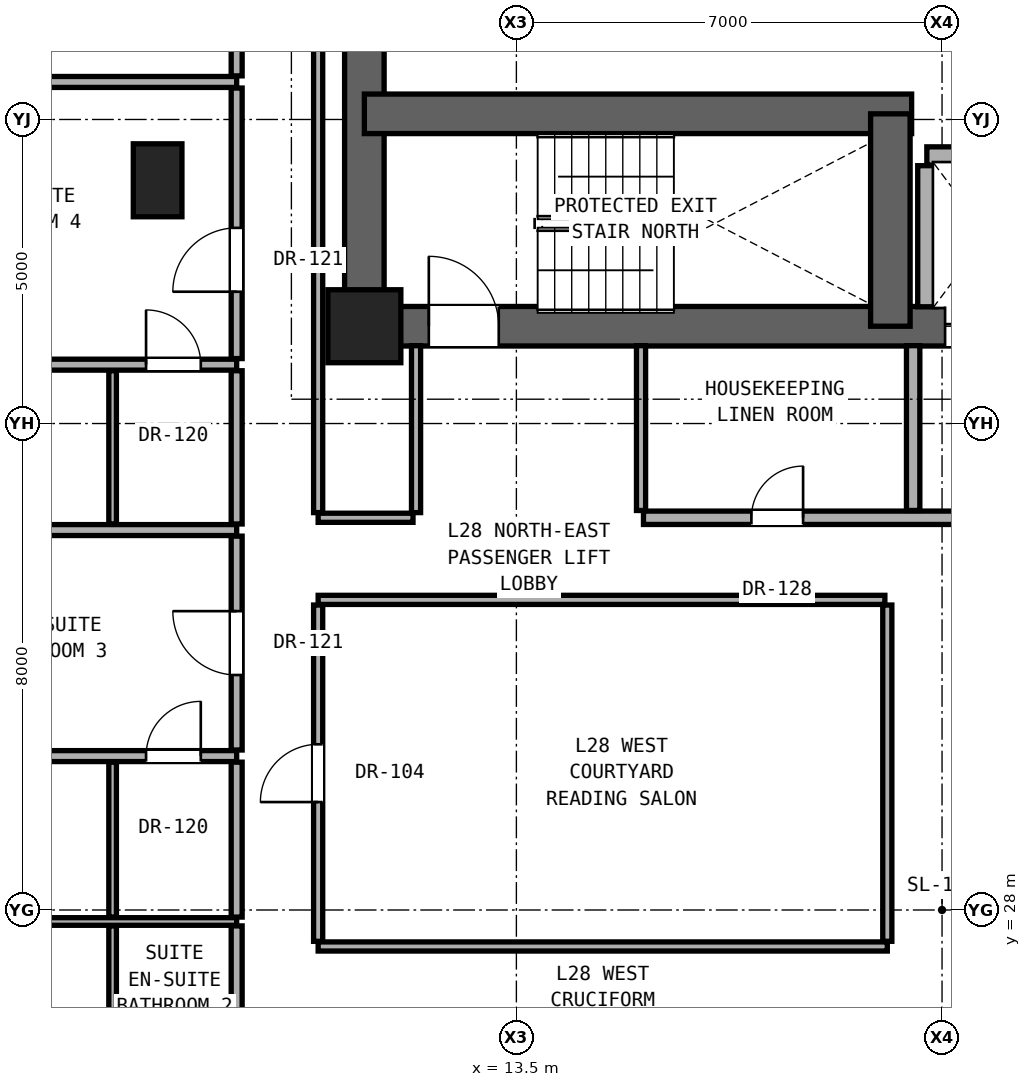
"""IFC4 building model, lengths in metres.
Left out: names, types, materials, properties, quantities, classifications, styles, units other than length and angle.
Written with IfcOpenShell. Run it as: python <this file> out.ifc"""

import sys

from ifc_helpers import new_model, si_unit, direction, frame, frame_2d, origin, origin_2d, place, context, subcontext, project, spatial, rectangle, extrude, element, fill, save


model = new_model("IFC4")
c1 = context("Model", 3, precision=1e-05, world=origin(), true_north=direction((0.0, 1.0)))
c2 = subcontext(c1, "Body", "Model", "MODEL_VIEW")
j1 = project(units=[si_unit("LENGTHUNIT", "METRE"), si_unit("PLANEANGLEUNIT", "RADIAN")], contexts=[c1])
p1 = place(None, origin())
s1 = spatial("IfcSite", under=j1, at=p1, CompositionType="ELEMENT")
p2 = place(p1, origin())
s2 = spatial("IfcBuilding", under=s1, at=p2, CompositionType="ELEMENT")
p3 = place(p2, frame((0.0, 0.0, 101.6)))
s3 = spatial("IfcBuildingStorey", under=s2, at=p3, CompositionType="ELEMENT", Elevation=101.6)
p4 = place(p3, frame((11.0, 37.6, 0.0), z_axis=(0.0, 0.0, 1.0), x_axis=(1.0, 0.0, 0.0)))
e1 = element("IfcColumn", 1, at=p4, inside=s3, PredefinedType="COLUMN", context=c2, shape_type="SweptSolid", body=[
    extrude(rectangle(XDim=1.2, YDim=1.2, at=origin_2d()), origin(), (0.0, 0.0, 1.0), 3.3),
])
p5 = place(p3, frame((7.6, 40.0, 0.0), z_axis=(0.0, 0.0, 1.0), x_axis=(1.0, 0.0, 0.0)))
e2 = element("IfcColumn", 2, at=p5, inside=s3, PredefinedType="PILASTER", context=c2, shape_type="SweptSolid", body=[
    extrude(rectangle(XDim=0.8, YDim=1.2, at=origin_2d()), origin(), (0.0, 0.0, 1.0), 3.3),
])
p6 = place(p3, frame((11.0, 37.6, 0.0), z_axis=(0.0, 0.0, 1.0), x_axis=(0.0, 1.0, 0.0)))
e3 = element("IfcWall", 3, at=p6, inside=s3, PredefinedType="SHEAR", context=c2, shape_type="SweptSolid", body=[
    extrude(rectangle(XDim=6.0, YDim=0.65, at=frame_2d((3.0, 0.0))), origin(), (0.0, 0.0, 1.0), 3.08),
])
p7 = place(p3, frame((11.0, 37.6, 0.0), z_axis=(0.0, 0.0, 1.0), x_axis=(1.0, 0.0, 0.0)))
e4 = element("IfcWall", 4, at=p7, inside=s3, PredefinedType="SHEAR", context=c2, shape_type="SweptSolid", body=[
    extrude(rectangle(XDim=19.0, YDim=0.65, at=frame_2d((9.5, 0.0))), origin(), (0.0, 0.0, 1.0), 3.08),
])
p8 = place(p7, frame((1.06, 0.0, 0.0)))
e5 = element("IfcOpeningElement", 5, at=p8, cuts=e4, PredefinedType="OPENING", context=c2, shape_type="SweptSolid", body=[
    extrude(rectangle(XDim=1.15, YDim=2.2, at=frame_2d((0.575, 1.1))), frame((0.0, 0.335, 0.0), z_axis=(0.0, -1.0, 0.0), x_axis=(1.0, 0.0, 0.0)), (0.0, 0.0, 1.0), 0.67),
])
p9 = place(p7, frame((9.55, 0.0, 0.0)))
e6 = element("IfcOpeningElement", 6, at=p9, cuts=e4, PredefinedType="OPENING", context=c2, shape_type="SweptSolid", body=[
    extrude(rectangle(XDim=1.4, YDim=2.35, at=frame_2d((0.7, 1.175))), frame((0.0, 0.335, 0.0), z_axis=(0.0, -1.0, 0.0), x_axis=(1.0, 0.0, 0.0)), (0.0, 0.0, 1.0), 0.67),
])
p10 = place(p7, frame((11.95, 0.0, 0.0)))
e7 = element("IfcOpeningElement", 7, at=p10, cuts=e4, PredefinedType="OPENING", context=c2, shape_type="SweptSolid", body=[
    extrude(rectangle(XDim=1.4, YDim=2.35, at=frame_2d((0.7, 1.175))), frame((0.0, 0.335, 0.0), z_axis=(0.0, -1.0, 0.0), x_axis=(1.0, 0.0, 0.0)), (0.0, 0.0, 1.0), 0.67),
])
p11 = place(p3, frame((11.0, 41.093, 0.0), z_axis=(0.0, 0.0, 1.0), x_axis=(1.0, 0.0, 0.0)))
e8 = element("IfcWall", 8, at=p11, inside=s3, PredefinedType="SHEAR", context=c2, shape_type="SweptSolid", body=[
    extrude(rectangle(XDim=9.0, YDim=0.65, at=frame_2d((4.5, 0.0))), origin(), (0.0, 0.0, 1.0), 3.08),
])
p12 = place(p3, frame((19.65, 37.6, 0.0), z_axis=(0.0, 0.0, 1.0), x_axis=(0.0, 1.0, 0.0)))
e9 = element("IfcWall", 9, at=p12, inside=s3, PredefinedType="SHEAR", context=c2, shape_type="SweptSolid", body=[
    extrude(rectangle(XDim=3.493, YDim=0.65, at=frame_2d((1.747, 0.0))), origin(), (0.0, 0.0, 1.0), 3.08),
])
p13 = place(p3, frame((10.24, 27.4, 0.0), z_axis=(0.0, 0.0, 1.0), x_axis=(1.0, 0.0, 0.0)))
e10 = element("IfcWall", 10, at=p13, inside=s3, PredefinedType="PARTITIONING", context=c2, shape_type="SweptSolid", body=[
    extrude(rectangle(XDim=9.36, YDim=0.15, at=frame_2d((4.68, 0.0))), origin(), (0.0, 0.0, 1.0), 2.124),
])
p14 = place(p3, frame((-0.85, 27.811, 0.0), z_axis=(0.0, 0.0, 1.0), x_axis=(1.0, 0.0, 0.0)))
e11 = element("IfcWall", 11, at=p14, inside=s3, PredefinedType="PARTITIONING", context=c2, shape_type="SweptSolid", body=[
    extrude(rectangle(XDim=9.75, YDim=0.125, at=frame_2d((4.875, 0.0))), origin(), (0.0, 0.0, 1.0), 2.145),
])
p15 = place(p3, frame((-0.85, 30.531, 0.0), z_axis=(0.0, 0.0, 1.0), x_axis=(1.0, 0.0, 0.0)))
e12 = element("IfcWall", 12, at=p15, inside=s3, PredefinedType="PARTITIONING", context=c2, shape_type="SweptSolid", body=[
    extrude(rectangle(XDim=9.75, YDim=0.18, at=frame_2d((4.875, 0.0))), origin(), (0.0, 0.0, 1.0), 2.145),
])
p16 = place(p15, frame((3.75, 0.0, 0.0)))
e13 = element("IfcOpeningElement", 13, at=p16, cuts=e12, PredefinedType="OPENING", context=c2, shape_type="SweptSolid", body=[
    extrude(rectangle(XDim=0.85, YDim=2.01, at=frame_2d((0.425, 1.005))), frame((0.0, 0.1, 0.0), z_axis=(0.0, -1.0, 0.0), x_axis=(1.0, 0.0, 0.0)), (0.0, 0.0, 1.0), 0.2),
])
p17 = place(p15, frame((8.26, 0.0, 0.0)))
e14 = element("IfcOpeningElement", 14, at=p17, cuts=e12, PredefinedType="OPENING", context=c2, shape_type="SweptSolid", body=[
    extrude(rectangle(XDim=0.9, YDim=2.1, at=frame_2d((0.45, 1.05))), frame((0.0, 0.1, 0.0), z_axis=(0.0, -1.0, 0.0), x_axis=(1.0, 0.0, 0.0)), (0.0, 0.0, 1.0), 0.2),
])
p18 = place(p3, frame((10.24, 33.1, 0.0), z_axis=(0.0, 0.0, 1.0), x_axis=(1.0, 0.0, 0.0)))
e15 = element("IfcWall", 15, at=p18, inside=s3, PredefinedType="PARTITIONING", context=c2, shape_type="SweptSolid", body=[
    extrude(rectangle(XDim=9.32, YDim=0.15, at=frame_2d((4.66, 0.0))), origin(), (0.0, 0.0, 1.0), 2.124),
])
p19 = place(p3, frame((-0.85, 34.248, 0.0), z_axis=(0.0, 0.0, 1.0), x_axis=(1.0, 0.0, 0.0)))
e16 = element("IfcWall", 16, at=p19, inside=s3, PredefinedType="PARTITIONING", context=c2, shape_type="SweptSolid", body=[
    extrude(rectangle(XDim=9.75, YDim=0.18, at=frame_2d((4.875, 0.0))), origin(), (0.0, 0.0, 1.0), 2.145),
])
p20 = place(p3, frame((10.24, 34.45, 0.0), z_axis=(0.0, 0.0, 1.0), x_axis=(1.0, 0.0, 0.0)))
e17 = element("IfcWall", 17, at=p20, inside=s3, PredefinedType="PARTITIONING", context=c2, shape_type="SweptSolid", body=[
    extrude(rectangle(XDim=1.56, YDim=0.15, at=frame_2d((0.78, 0.0))), origin(), (0.0, 0.0, 1.0), 2.124),
])
p21 = place(p3, frame((15.59, 34.45, 0.0), z_axis=(0.0, 0.0, 1.0), x_axis=(1.0, 0.0, 0.0)))
e18 = element("IfcWall", 18, at=p21, inside=s3, PredefinedType="SOLIDWALL", context=c2, shape_type="SweptSolid", body=[
    extrude(rectangle(XDim=15.17, YDim=0.22, at=frame_2d((7.585, 0.0))), origin(), (0.0, 0.0, 1.0), 2.124),
])
p22 = place(p21, frame((6.435, 0.0, 0.0)))
e19 = element("IfcOpeningElement", 19, at=p22, cuts=e18, PredefinedType="OPENING", context=c2, shape_type="SweptSolid", body=[
    extrude(rectangle(XDim=0.85, YDim=2.01, at=frame_2d((0.425, 1.005))), frame((0.0, 0.12, 0.0), z_axis=(0.0, -1.0, 0.0), x_axis=(1.0, 0.0, 0.0)), (0.0, 0.0, 1.0), 0.24),
])
p23 = place(p21, frame((11.135, 0.0, 0.0)))
e20 = element("IfcOpeningElement", 20, at=p23, cuts=e18, PredefinedType="OPENING", context=c2, shape_type="SweptSolid", body=[
    extrude(rectangle(XDim=0.85, YDim=2.01, at=frame_2d((0.425, 1.005))), frame((0.0, 0.12, 0.0), z_axis=(0.0, -1.0, 0.0), x_axis=(1.0, 0.0, 0.0)), (0.0, 0.0, 1.0), 0.24),
])
p24 = place(p21, frame((1.775, 0.0, 0.0)))
e21 = element("IfcOpeningElement", 21, at=p24, cuts=e18, PredefinedType="OPENING", context=c2, shape_type="SweptSolid", body=[
    extrude(rectangle(XDim=0.85, YDim=2.01, at=frame_2d((0.425, 1.005))), frame((0.0, 0.12, 0.0), z_axis=(0.0, -1.0, 0.0), x_axis=(1.0, 0.0, 0.0)), (0.0, 0.0, 1.0), 0.24),
])
p25 = place(p3, frame((-0.85, 36.968, 0.0), z_axis=(0.0, 0.0, 1.0), x_axis=(1.0, 0.0, 0.0)))
e22 = element("IfcWall", 22, at=p25, inside=s3, PredefinedType="PARTITIONING", context=c2, shape_type="SweptSolid", body=[
    extrude(rectangle(XDim=9.75, YDim=0.18, at=frame_2d((4.875, 0.0))), origin(), (0.0, 0.0, 1.0), 2.145),
])
p26 = place(p25, frame((3.75, 0.0, 0.0)))
e23 = element("IfcOpeningElement", 23, at=p26, cuts=e22, PredefinedType="OPENING", context=c2, shape_type="SweptSolid", body=[
    extrude(rectangle(XDim=0.85, YDim=2.01, at=frame_2d((0.425, 1.005))), frame((0.0, 0.1, 0.0), z_axis=(0.0, -1.0, 0.0), x_axis=(1.0, 0.0, 0.0)), (0.0, 0.0, 1.0), 0.2),
])
p27 = place(p25, frame((8.26, 0.0, 0.0)))
e24 = element("IfcOpeningElement", 24, at=p27, cuts=e22, PredefinedType="OPENING", context=c2, shape_type="SweptSolid", body=[
    extrude(rectangle(XDim=0.9, YDim=2.1, at=frame_2d((0.45, 1.05))), frame((0.0, 0.1, 0.0), z_axis=(0.0, -1.0, 0.0), x_axis=(1.0, 0.0, 0.0)), (0.0, 0.0, 1.0), 0.2),
])
p28 = place(p3, frame((20.25, 40.4, 0.0), z_axis=(0.0, 0.0, 1.0), x_axis=(1.0, 0.0, 0.0)))
e25 = element("IfcWall", 25, at=p28, inside=s3, PredefinedType="SOLIDWALL", context=c2, shape_type="SweptSolid", body=[
    extrude(rectangle(XDim=4.4, YDim=0.3, at=frame_2d((2.2, 0.0))), origin(), (0.0, 0.0, 1.0), 3.08),
])
p29 = place(p3, frame((4.475, 41.617, 0.0), z_axis=(0.0, 0.0, 1.0), x_axis=(1.0, 0.0, 0.0)))
e26 = element("IfcWall", 26, at=p29, inside=s3, PredefinedType="PARTITIONING", context=c2, shape_type="SweptSolid", body=[
    extrude(rectangle(XDim=4.425, YDim=0.18, at=frame_2d((2.212, 0.0))), origin(), (0.0, 0.0, 1.0), 3.08),
])
p30 = place(p3, frame((6.86, 25.348, 0.0), z_axis=(0.0, 0.0, 1.0), x_axis=(0.0, 1.0, 0.0)))
e27 = element("IfcWall", 27, at=p30, inside=s3, PredefinedType="PARTITIONING", context=c2, shape_type="SweptSolid", body=[
    extrude(rectangle(XDim=2.391, YDim=0.125, at=frame_2d((1.195, 0.0))), origin(), (0.0, 0.0, 1.0), 3.08),
])
p31 = place(p3, frame((6.86, 27.884, 0.0), z_axis=(0.0, 0.0, 1.0), x_axis=(0.0, 1.0, 0.0)))
e28 = element("IfcWall", 28, at=p31, inside=s3, PredefinedType="PARTITIONING", context=c2, shape_type="SweptSolid", body=[
    extrude(rectangle(XDim=2.547, YDim=0.125, at=frame_2d((1.274, 0.0))), origin(), (0.0, 0.0, 1.0), 3.08),
])
p32 = place(p3, frame((6.86, 34.348, 0.0), z_axis=(0.0, 0.0, 1.0), x_axis=(0.0, 1.0, 0.0)))
e29 = element("IfcWall", 29, at=p32, inside=s3, PredefinedType="PARTITIONING", context=c2, shape_type="SweptSolid", body=[
    extrude(rectangle(XDim=2.52, YDim=0.125, at=frame_2d((1.26, 0.0))), origin(), (0.0, 0.0, 1.0), 3.08),
])
p33 = place(p3, frame((8.9, 25.348, 0.0), z_axis=(0.0, 0.0, 1.0), x_axis=(0.0, 1.0, 0.0)))
e30 = element("IfcWall", 30, at=p33, inside=s3, PredefinedType="PARTITIONING", context=c2, shape_type="SweptSolid", body=[
    extrude(rectangle(XDim=2.391, YDim=0.18, at=frame_2d((1.195, 0.0))), origin(), (0.0, 0.0, 1.0), 3.08),
])
p34 = place(p3, frame((8.9, 27.884, 0.0), z_axis=(0.0, 0.0, 1.0), x_axis=(0.0, 1.0, 0.0)))
e31 = element("IfcWall", 31, at=p34, inside=s3, PredefinedType="PARTITIONING", context=c2, shape_type="SweptSolid", body=[
    extrude(rectangle(XDim=2.547, YDim=0.18, at=frame_2d((1.274, 0.0))), origin(), (0.0, 0.0, 1.0), 3.08),
])
p35 = place(p3, frame((8.9, 30.631, 0.0), z_axis=(0.0, 0.0, 1.0), x_axis=(0.0, 1.0, 0.0)))
e32 = element("IfcWall", 32, at=p35, inside=s3, PredefinedType="PARTITIONING", context=c2, shape_type="SweptSolid", body=[
    extrude(rectangle(XDim=3.517, YDim=0.18, at=frame_2d((1.758, 0.0))), origin(), (0.0, 0.0, 1.0), 2.299),
])
p36 = place(p35, frame((1.233, 0.0, 0.0)))
e33 = element("IfcOpeningElement", 33, at=p36, cuts=e32, PredefinedType="OPENING", context=c2, shape_type="SweptSolid", body=[
    extrude(rectangle(XDim=1.05, YDim=2.2, at=frame_2d((0.525, 1.1))), frame((0.0, 0.1, 0.0), z_axis=(0.0, -1.0, 0.0), x_axis=(1.0, 0.0, 0.0)), (0.0, 0.0, 1.0), 0.2),
])
p37 = place(p3, frame((8.9, 34.348, 0.0), z_axis=(0.0, 0.0, 1.0), x_axis=(0.0, 1.0, 0.0)))
e34 = element("IfcWall", 34, at=p37, inside=s3, PredefinedType="PARTITIONING", context=c2, shape_type="SweptSolid", body=[
    extrude(rectangle(XDim=2.52, YDim=0.18, at=frame_2d((1.26, 0.0))), origin(), (0.0, 0.0, 1.0), 3.08),
])
p38 = place(p3, frame((8.9, 37.068, 0.0), z_axis=(0.0, 0.0, 1.0), x_axis=(0.0, 1.0, 0.0)))
e35 = element("IfcWall", 35, at=p38, inside=s3, PredefinedType="PARTITIONING", context=c2, shape_type="SweptSolid", body=[
    extrude(rectangle(XDim=4.449, YDim=0.18, at=frame_2d((2.225, 0.0))), origin(), (0.0, 0.0, 1.0), 2.456),
])
p39 = place(p38, frame((1.1, 0.0, 0.0)))
e36 = element("IfcOpeningElement", 36, at=p39, cuts=e35, PredefinedType="OPENING", context=c2, shape_type="SweptSolid", body=[
    extrude(rectangle(XDim=1.05, YDim=2.2, at=frame_2d((0.525, 1.1))), frame((0.0, 0.1, 0.0), z_axis=(0.0, -1.0, 0.0), x_axis=(1.0, 0.0, 0.0)), (0.0, 0.0, 1.0), 0.2),
])
p40 = place(p3, frame((8.9, 41.717, 0.0), z_axis=(0.0, 0.0, 1.0), x_axis=(0.0, 1.0, 0.0)))
e37 = element("IfcWall", 37, at=p40, inside=s3, PredefinedType="PARTITIONING", context=c2, shape_type="SweptSolid", body=[
    extrude(rectangle(XDim=5.205, YDim=0.18, at=frame_2d((2.603, 0.0))), origin(), (0.0, 0.0, 1.0), 3.08),
])
p41 = place(p40, frame((2.127, 0.0, 0.0)))
e38 = element("IfcOpeningElement", 38, at=p41, cuts=e37, PredefinedType="OPENING", context=c2, shape_type="SweptSolid", body=[
    extrude(rectangle(XDim=0.95, YDim=2.15, at=frame_2d((0.475, 1.075))), frame((0.0, 0.1, 0.0), z_axis=(0.0, -1.0, 0.0), x_axis=(1.0, 0.0, 0.0)), (0.0, 0.0, 1.0), 0.2),
])
p42 = place(p3, frame((10.24, 27.485, 0.0), z_axis=(0.0, 0.0, 1.0), x_axis=(0.0, 1.0, 0.0)))
e39 = element("IfcWall", 39, at=p42, inside=s3, PredefinedType="PARTITIONING", context=c2, shape_type="SweptSolid", body=[
    extrude(rectangle(XDim=5.53, YDim=0.15, at=frame_2d((2.765, 0.0))), origin(), (0.0, 0.0, 1.0), 2.299),
])
p43 = place(p42, frame((2.29, 0.0, 0.0)))
e40 = element("IfcOpeningElement", 40, at=p43, cuts=e39, PredefinedType="OPENING", context=c2, shape_type="SweptSolid", body=[
    extrude(rectangle(XDim=0.95, YDim=2.15, at=frame_2d((0.475, 1.075))), frame((0.0, 0.085, 0.0), z_axis=(0.0, -1.0, 0.0), x_axis=(1.0, 0.0, 0.0)), (0.0, 0.0, 1.0), 0.17),
])
p44 = place(p3, frame((10.24, 34.535, 0.0), z_axis=(0.0, 0.0, 1.0), x_axis=(0.0, 1.0, 0.0)))
e41 = element("IfcWall", 41, at=p44, inside=s3, PredefinedType="PARTITIONING", context=c2, shape_type="SweptSolid", body=[
    extrude(rectangle(XDim=9.13, YDim=0.15, at=frame_2d((4.565, 0.0))), origin(), (0.0, 0.0, 1.0), 2.456),
])
p45 = place(p3, frame((11.85, 34.535, 0.0), z_axis=(0.0, 0.0, 1.0), x_axis=(0.0, 1.0, 0.0)))
e42 = element("IfcWall", 42, at=p45, inside=s3, PredefinedType="PARTITIONING", context=c2, shape_type="SweptSolid", body=[
    extrude(rectangle(XDim=2.745, YDim=0.15, at=frame_2d((1.373, 0.0))), origin(), (0.0, 0.0, 1.0), 3.08),
])
p46 = place(p3, frame((15.55, 34.57, 0.0), z_axis=(0.0, 0.0, 1.0), x_axis=(0.0, 1.0, 0.0)))
e43 = element("IfcWall", 43, at=p46, inside=s3, PredefinedType="PARTITIONING", context=c2, shape_type="SweptSolid", body=[
    extrude(rectangle(XDim=2.71, YDim=0.15, at=frame_2d((1.355, 0.0))), origin(), (0.0, 0.0, 1.0), 2.609),
])
p47 = place(p3, frame((19.6, 27.485, 0.0), z_axis=(0.0, 0.0, 1.0), x_axis=(0.0, 1.0, 0.0)))
e44 = element("IfcWall", 44, at=p47, inside=s3, PredefinedType="PARTITIONING", context=c2, shape_type="SweptSolid", body=[
    extrude(rectangle(XDim=5.53, YDim=0.15, at=frame_2d((2.765, 0.0))), origin(), (0.0, 0.0, 1.0), 2.124),
])
p48 = place(p3, frame((20.025, 34.57, 0.0), z_axis=(0.0, 0.0, 1.0), x_axis=(0.0, 1.0, 0.0)))
e45 = element("IfcWall", 45, at=p48, inside=s3, PredefinedType="SOLIDWALL", context=c2, shape_type="SweptSolid", body=[
    extrude(rectangle(XDim=2.71, YDim=0.22, at=frame_2d((1.355, 0.0))), origin(), (0.0, 0.0, 1.0), 3.08),
])
p49 = place(p3, frame((20.25, 37.92, 0.0), z_axis=(0.0, 0.0, 1.0), x_axis=(0.0, 1.0, 0.0)))
e46 = element("IfcWall", 46, at=p49, inside=s3, PredefinedType="SOLIDWALL", context=c2, shape_type="SweptSolid", body=[
    extrude(rectangle(XDim=2.32, YDim=0.3, at=frame_2d((1.16, 0.0))), origin(), (0.0, 0.0, 1.0), 3.08),
])
p50 = place(p8, origin())
e47 = element("IfcDoor", 47, at=p50, inside=s3, OperationType="SINGLE_SWING_LEFT", PredefinedType="DOOR", context=c2, shape_type="SweptSolid", body=[
    extrude(rectangle(XDim=1.15, YDim=2.2, at=frame_2d((0.575, 1.1))), frame((0.0, 0.025, 0.0), z_axis=(0.0, -1.0, 0.0), x_axis=(1.0, 0.0, 0.0)), (0.0, 0.0, 1.0), 0.05),
])
fill(e5, e47)
p51 = place(p24, origin())
e48 = element("IfcDoor", 48, at=p51, inside=s3, OperationType="SINGLE_SWING_RIGHT", PredefinedType="DOOR", context=c2, shape_type="SweptSolid", body=[
    extrude(rectangle(XDim=0.85, YDim=2.01, at=frame_2d((0.425, 1.005))), frame((0.0, 0.025, 0.0), z_axis=(0.0, -1.0, 0.0), x_axis=(1.0, 0.0, 0.0)), (0.0, 0.0, 1.0), 0.05),
])
fill(e21, e48)
p52 = place(p36, origin())
e49 = element("IfcDoor", 49, at=p52, inside=s3, OperationType="SINGLE_SWING_RIGHT", PredefinedType="DOOR", context=c2, shape_type="SweptSolid", body=[
    extrude(rectangle(XDim=1.05, YDim=2.2, at=frame_2d((0.525, 1.1))), frame((0.0, 0.025, 0.0), z_axis=(0.0, -1.0, 0.0), x_axis=(1.0, 0.0, 0.0)), (0.0, 0.0, 1.0), 0.05),
])
fill(e33, e49)
p53 = place(p17, origin())
e50 = element("IfcDoor", 50, at=p53, inside=s3, OperationType="SINGLE_SWING_RIGHT", PredefinedType="DOOR", context=c2, shape_type="SweptSolid", body=[
    extrude(rectangle(XDim=0.9, YDim=2.1, at=frame_2d((0.45, 1.05))), frame((0.0, 0.025, 0.0), z_axis=(0.0, -1.0, 0.0), x_axis=(1.0, 0.0, 0.0)), (0.0, 0.0, 1.0), 0.05),
])
fill(e14, e50)
p54 = place(p39, origin())
e51 = element("IfcDoor", 51, at=p54, inside=s3, OperationType="SINGLE_SWING_LEFT", PredefinedType="DOOR", context=c2, shape_type="SweptSolid", body=[
    extrude(rectangle(XDim=1.05, YDim=2.2, at=frame_2d((0.525, 1.1))), frame((0.0, 0.025, 0.0), z_axis=(0.0, -1.0, 0.0), x_axis=(1.0, 0.0, 0.0)), (0.0, 0.0, 1.0), 0.05),
])
fill(e36, e51)
p55 = place(p27, origin())
e52 = element("IfcDoor", 52, at=p55, inside=s3, OperationType="SINGLE_SWING_LEFT", PredefinedType="DOOR", context=c2, shape_type="SweptSolid", body=[
    extrude(rectangle(XDim=0.9, YDim=2.1, at=frame_2d((0.45, 1.05))), frame((0.0, 0.025, 0.0), z_axis=(0.0, -1.0, 0.0), x_axis=(1.0, 0.0, 0.0)), (0.0, 0.0, 1.0), 0.05),
])
fill(e24, e52)
p56 = place(p43, origin())
e53 = element("IfcDoor", 53, at=p56, inside=s3, OperationType="SINGLE_SWING_LEFT", PredefinedType="DOOR", context=c2, shape_type="SweptSolid", body=[
    extrude(rectangle(XDim=0.95, YDim=2.15, at=frame_2d((0.475, 1.075))), frame((0.0, 0.025, 0.0), z_axis=(0.0, -1.0, 0.0), x_axis=(1.0, 0.0, 0.0)), (0.0, 0.0, 1.0), 0.05),
])
fill(e40, e53)
p57 = place(p9, origin())
e54 = element("IfcDoor", 54, at=p57, inside=s3, OperationType="DOUBLE_DOOR_SLIDING", PredefinedType="DOOR", context=c2, shape_type="SweptSolid", body=[
    extrude(rectangle(XDim=1.4, YDim=2.35, at=frame_2d((0.7, 1.175))), frame((0.0, 0.025, 0.0), z_axis=(0.0, -1.0, 0.0), x_axis=(1.0, 0.0, 0.0)), (0.0, 0.0, 1.0), 0.05),
])
fill(e6, e54)
save(model, sys.argv[1])
